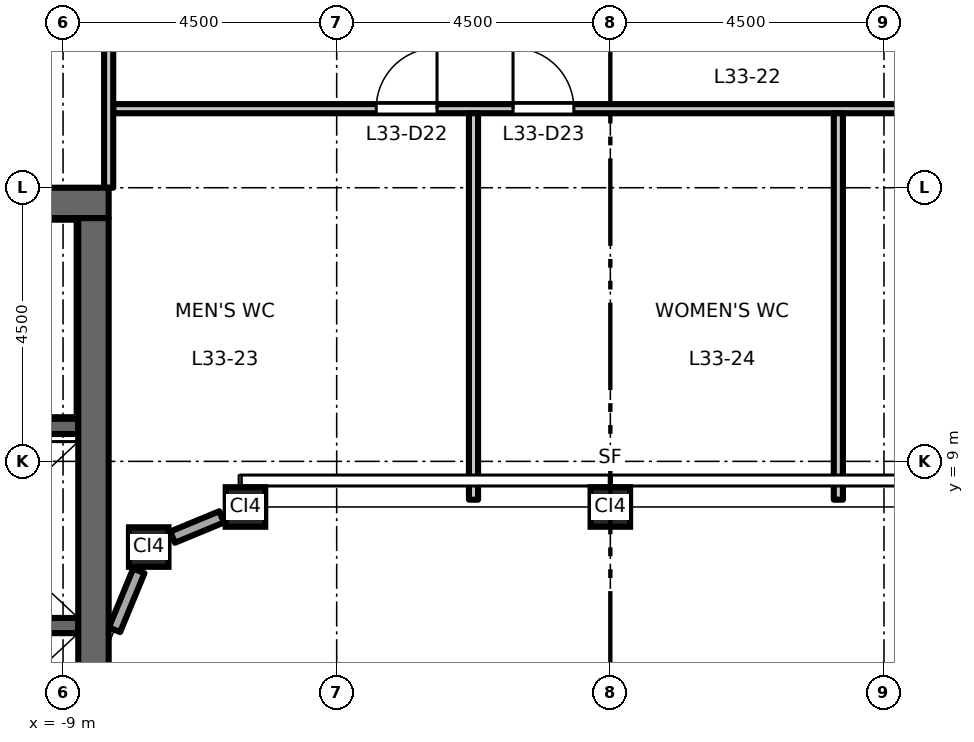
"""IFC4 building model, lengths in metres.
Left out: names, types, materials, properties, quantities, classifications, styles, units other than length and angle.
Written with IfcOpenShell. Run it as: python <this file> out.ifc"""

import sys

from ifc_helpers import new_model, si_unit, direction, frame, frame_2d, origin, origin_2d, place, context, subcontext, project, spatial, rectangle, hollow_rectangle, extrude, element, fill, save


model = new_model("IFC4")
c1 = context("Model", 3, precision=1e-05, world=origin(), true_north=direction((0.0, 1.0)))
c2 = subcontext(c1, "Body", "Model", "MODEL_VIEW")
j1 = project(units=[si_unit("LENGTHUNIT", "METRE"), si_unit("PLANEANGLEUNIT", "RADIAN")], contexts=[c1])
p1 = place(None, origin())
s1 = spatial("IfcSite", under=j1, at=p1, CompositionType="ELEMENT")
p2 = place(p1, origin())
s2 = spatial("IfcBuilding", under=s1, at=p2, CompositionType="ELEMENT")
p3 = place(p2, frame((0.0, 0.0, 154.2)))
s3 = spatial("IfcBuildingStorey", under=s2, at=p3, CompositionType="ELEMENT", Elevation=154.2)
for number, where, z_axis, x_axis in (
    (1, (-7.591, 7.591, 0.0), (0.0, 0.0, 1.0), (1.0, 0.0, 0.0)),
    (2, (-6.0, 8.25, 0.0), (0.0, 0.0, 1.0), (1.0, 0.0, 0.0)),
    (3, (0.0, 8.25, 0.0), (0.0, 0.0, 1.0), (1.0, 0.0, 0.0)),
):
    element("IfcColumn", number, at=place(p3, frame(where, z_axis=z_axis, x_axis=x_axis)), inside=s3, PredefinedType="COLUMN", context=c2, shape_type="SweptSolid", body=[
        extrude(hollow_rectangle(XDim=0.65, YDim=0.65, WallThickness=0.036, at=origin_2d()), origin(), (0.0, 0.0, 1.0), 4.5),
    ])
p4 = place(p3, frame((-8.75, 6.3, 0.0), z_axis=(0.0, 0.0, 1.0), x_axis=(-1.0, 0.0, 0.0)))
e4 = element("IfcWall", 4, at=p4, inside=s3, PredefinedType="SHEAR", context=c2, shape_type="SweptSolid", body=[
    extrude(rectangle(XDim=3.1, YDim=0.25, at=frame_2d((1.55, 0.0))), origin(), (0.0, 0.0, 1.0), 4.35),
])
p5 = place(p3, frame((-8.75, 9.575, 0.0), z_axis=(0.0, 0.0, 1.0), x_axis=(-1.0, 0.0, 0.0)))
e5 = element("IfcWall", 5, at=p5, inside=s3, PredefinedType="SHEAR", context=c2, shape_type="SweptSolid", body=[
    extrude(rectangle(XDim=8.0, YDim=0.25, at=frame_2d((4.0, 0.0))), origin(), (0.0, 0.0, 1.0), 4.35),
])
p6 = place(p5, frame((6.65, 0.0, 0.0)))
e6 = element("IfcOpeningElement", 6, at=p6, cuts=e5, PredefinedType="OPENING", context=c2, shape_type="SweptSolid", body=[
    extrude(rectangle(XDim=1.1, YDim=2.1, at=frame_2d((0.55, 1.05))), frame((0.0, 0.135, 0.0), z_axis=(0.0, -1.0, 0.0), x_axis=(1.0, 0.0, 0.0)), (0.0, 0.0, 1.0), 0.27),
])
p7 = place(p3, frame((-8.25, 13.25, 0.0), z_axis=(0.0, 0.0, 1.0), x_axis=(-1.0, 0.0, 0.0)))
e7 = element("IfcWall", 7, at=p7, inside=s3, PredefinedType="SHEAR", context=c2, shape_type="SweptSolid", body=[
    extrude(rectangle(XDim=13.5, YDim=0.5, at=frame_2d((6.75, 0.0))), origin(), (0.0, 0.0, 1.0), 4.35),
])
p8 = place(p3, frame((-8.5, -13.0, 0.0), z_axis=(0.0, 0.0, 1.0), x_axis=(0.0, 1.0, 0.0)))
e8 = element("IfcWall", 8, at=p8, inside=s3, PredefinedType="SHEAR", context=c2, shape_type="SweptSolid", body=[
    extrude(rectangle(XDim=26.0, YDim=0.5, at=frame_2d((13.0, 0.0))), origin(), (0.0, 0.0, 1.0), 4.35),
])
p9 = place(p3, frame((-6.392, 8.087, 0.0), z_axis=(0.0, 0.0, 1.0), x_axis=(-0.923894108428, -0.382648241093, 0.0)))
e9 = element("IfcWall", 9, at=p9, inside=s3, PredefinedType="STANDARD", context=c2, shape_type="SweptSolid", body=[
    extrude(rectangle(XDim=0.873, YDim=0.2, at=frame_2d((0.437, 0.0))), origin(), (0.0, 0.0, 1.0), 3.826),
])
p10 = place(p3, frame((-7.753, 7.199, 0.0), z_axis=(0.0, 0.0, 1.0), x_axis=(-0.382694858887, -0.923874799408, 0.0)))
e10 = element("IfcWall", 10, at=p10, inside=s3, PredefinedType="STANDARD", context=c2, shape_type="SweptSolid", body=[
    extrude(rectangle(XDim=1.048, YDim=0.2, at=frame_2d((0.524, 0.0))), origin(), (0.0, 0.0, 1.0), 3.826),
])
p11 = place(p3, frame((-8.175, 14.8, 0.0), z_axis=(0.0, 0.0, 1.0), x_axis=(1.0, 0.0, 0.0)))
e11 = element("IfcWall", 11, at=p11, inside=s3, PredefinedType="PARTITIONING", context=c2, shape_type="SweptSolid", body=[
    extrude(rectangle(XDim=14.955, YDim=0.15, at=frame_2d((7.478, 0.0))), origin(), (0.0, 0.0, 1.0), 4.35),
])
p12 = place(p11, frame((4.325, 0.0, 0.0)))
e12 = element("IfcOpeningElement", 12, at=p12, cuts=e11, PredefinedType="OPENING", context=c2, shape_type="SweptSolid", body=[
    extrude(rectangle(XDim=1.0, YDim=2.1, at=frame_2d((0.5, 1.05))), frame((0.0, 0.085, 0.0), z_axis=(0.0, -1.0, 0.0), x_axis=(1.0, 0.0, 0.0)), (0.0, 0.0, 1.0), 0.17),
])
p13 = place(p11, frame((6.575, 0.0, 0.0)))
e13 = element("IfcOpeningElement", 13, at=p13, cuts=e11, PredefinedType="OPENING", context=c2, shape_type="SweptSolid", body=[
    extrude(rectangle(XDim=1.0, YDim=2.1, at=frame_2d((0.5, 1.05))), frame((0.0, 0.085, 0.0), z_axis=(0.0, -1.0, 0.0), x_axis=(1.0, 0.0, 0.0)), (0.0, 0.0, 1.0), 0.17),
])
p14 = place(p11, frame((13.325, 0.0, 0.0)))
e14 = element("IfcOpeningElement", 14, at=p14, cuts=e11, PredefinedType="OPENING", context=c2, shape_type="SweptSolid", body=[
    extrude(rectangle(XDim=1.0, YDim=2.1, at=frame_2d((0.5, 1.05))), frame((0.0, 0.085, 0.0), z_axis=(0.0, -1.0, 0.0), x_axis=(1.0, 0.0, 0.0)), (0.0, 0.0, 1.0), 0.17),
])
p15 = place(p3, frame((-8.25, 13.5, 0.0), z_axis=(0.0, 0.0, 1.0), x_axis=(0.0, 1.0, 0.0)))
e15 = element("IfcWall", 15, at=p15, inside=s3, PredefinedType="PARTITIONING", context=c2, shape_type="SweptSolid", body=[
    extrude(rectangle(XDim=3.425, YDim=0.15, at=frame_2d((1.712, 0.0))), origin(), (0.0, 0.0, 1.0), 4.35),
])
for number, where, z_axis, x_axis in (
    (16, (-2.25, 8.37, 0.0), (0.0, 0.0, 1.0), (0.0, 1.0, 0.0)),
    (17, (3.75, 8.37, 0.0), (0.0, 0.0, 1.0), (0.0, 1.0, 0.0)),
):
    element("IfcWall", number, at=place(p3, frame(where, z_axis=z_axis, x_axis=x_axis)), inside=s3, PredefinedType="PARTITIONING", context=c2, shape_type="SweptSolid", body=[
        extrude(rectangle(XDim=6.355, YDim=0.15, at=frame_2d((3.177, 0.0))), origin(), (0.0, 0.0, 1.0), 4.35),
    ])
p16 = place(p12, origin())
e18 = element("IfcDoor", 18, at=p16, inside=s3, OperationType="SINGLE_SWING_RIGHT", PredefinedType="DOOR", context=c2, shape_type="SweptSolid", body=[
    extrude(rectangle(XDim=1.0, YDim=2.1, at=frame_2d((0.5, 1.05))), frame((0.0, 0.025, 0.0), z_axis=(0.0, -1.0, 0.0), x_axis=(1.0, 0.0, 0.0)), (0.0, 0.0, 1.0), 0.05),
])
fill(e12, e18)
p17 = place(p13, origin())
e19 = element("IfcDoor", 19, at=p17, inside=s3, OperationType="SINGLE_SWING_LEFT", PredefinedType="DOOR", context=c2, shape_type="SweptSolid", body=[
    extrude(rectangle(XDim=1.0, YDim=2.1, at=frame_2d((0.5, 1.05))), frame((0.0, 0.025, 0.0), z_axis=(0.0, -1.0, 0.0), x_axis=(1.0, 0.0, 0.0)), (0.0, 0.0, 1.0), 0.05),
])
fill(e13, e19)
save(model, sys.argv[1])
